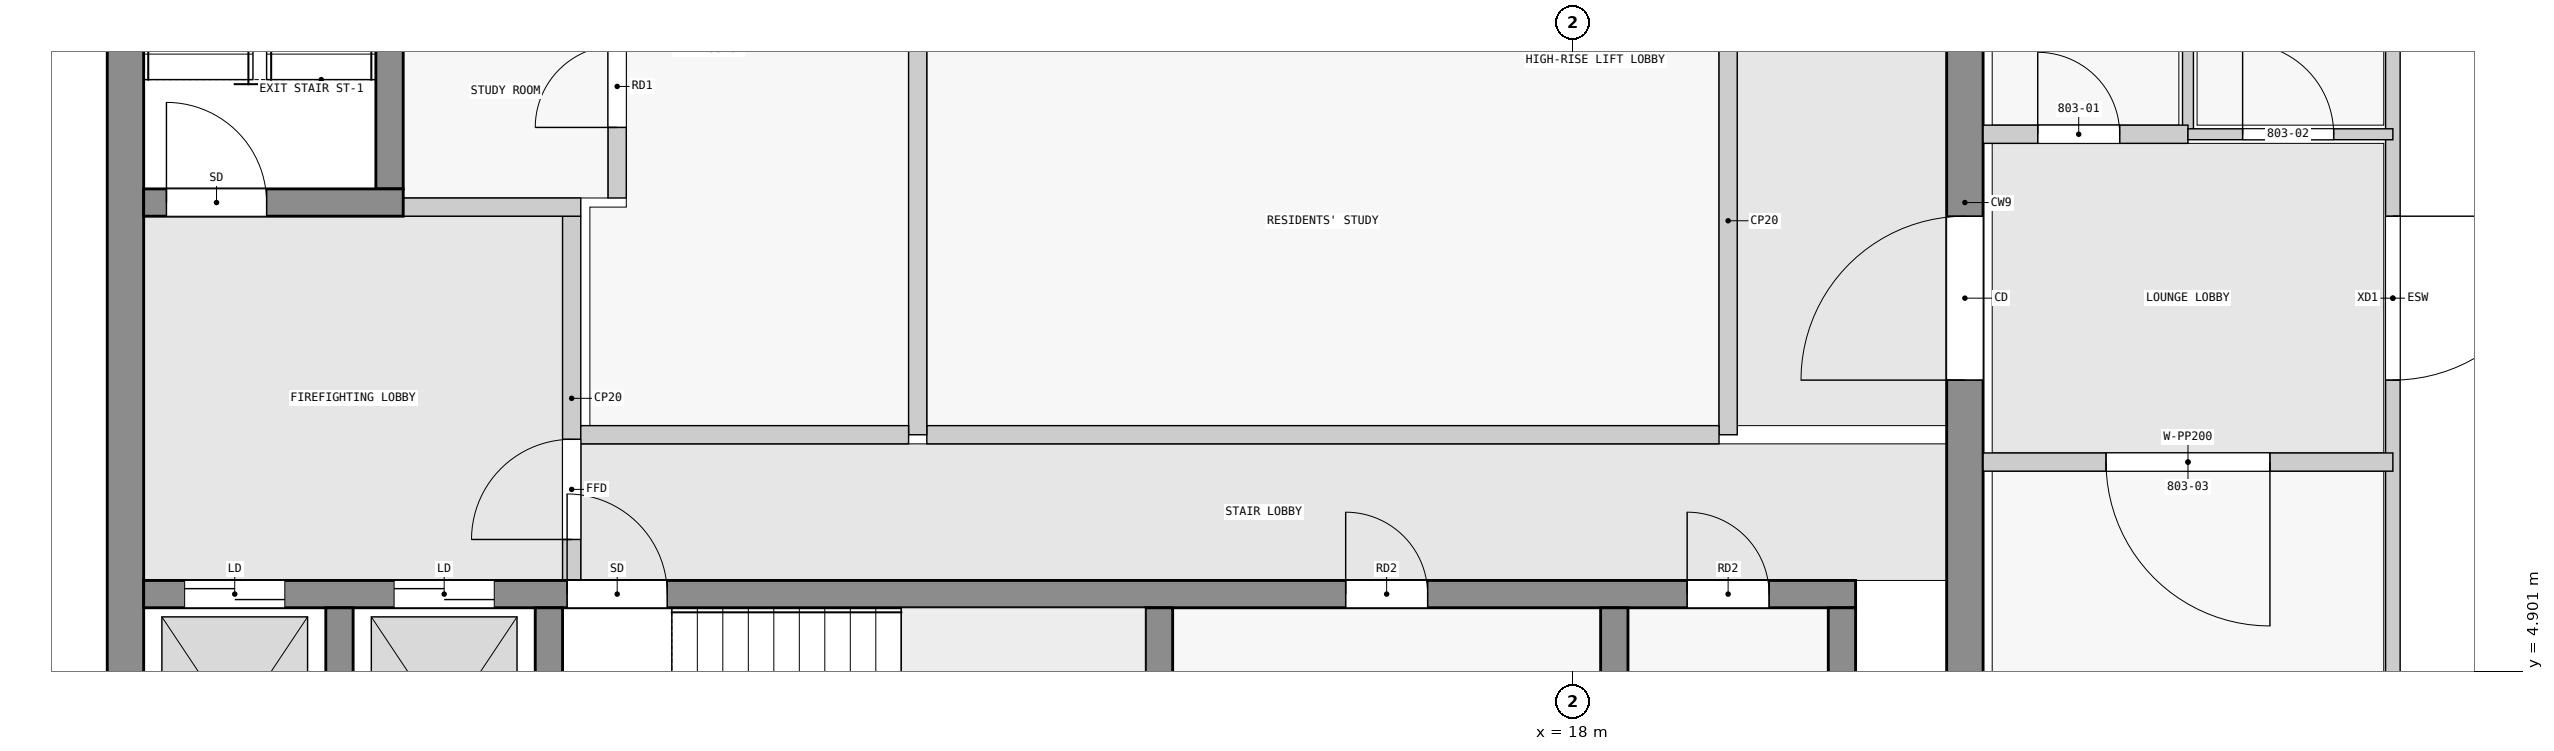
"""IFC4 building model, lengths in metres.
Left out: names, types, materials, properties, quantities, classifications, styles, units other than length and angle.
Written with IfcOpenShell. Run it as: python <this file> out.ifc"""

import sys

from ifc_helpers import new_model, si_unit, direction, frame, frame_2d, origin, place, context, subcontext, project, spatial, rectangle, extrude, element, fill, save


model = new_model("IFC4")
c1 = context("Model", 3, precision=1e-05, world=origin(), true_north=direction((0.0, 1.0)))
c2 = subcontext(c1, "Body", "Model", "MODEL_VIEW")
j1 = project(units=[si_unit("LENGTHUNIT", "METRE"), si_unit("PLANEANGLEUNIT", "RADIAN")], contexts=[c1])
p1 = place(None, origin())
s1 = spatial("IfcSite", under=j1, at=p1, CompositionType="ELEMENT")
p2 = place(p1, origin())
s2 = spatial("IfcBuilding", under=s1, at=p2, CompositionType="ELEMENT")
p3 = place(p2, frame((0.0, 0.0, 301.9)))
s3 = spatial("IfcBuildingStorey", under=s2, at=p3, CompositionType="ELEMENT", Elevation=301.9)
p4 = place(p3, frame((2.1, 2.5, 0.0), z_axis=(0.0, 0.0, 1.0), x_axis=(0.0, 1.0, 0.0)))
e1 = element("IfcWall", 1, at=p4, inside=s3, PredefinedType="SHEAR", context=c2, shape_type="SweptSolid", body=[
    extrude(rectangle(XDim=15.1, YDim=0.4, at=frame_2d((7.55, 0.0))), origin(), (0.0, 0.0, 1.0), 3.25),
])
p5 = place(p3, frame((22.3, 2.5, 0.0), z_axis=(0.0, 0.0, 1.0), x_axis=(0.0, 1.0, 0.0)))
e2 = element("IfcWall", 2, at=p5, inside=s3, PredefinedType="SHEAR", context=c2, shape_type="SweptSolid", body=[
    extrude(rectangle(XDim=15.1, YDim=0.4, at=frame_2d((7.55, 0.0))), origin(), (0.0, 0.0, 1.0), 3.25),
])
p6 = place(p5, frame((5.6, 0.0, 0.0)))
e3 = element("IfcOpeningElement", 3, at=p6, cuts=e2, PredefinedType="OPENING", context=c2, shape_type="SweptSolid", body=[
    extrude(rectangle(XDim=1.8, YDim=2.1, at=frame_2d((0.9, 1.05))), frame((0.0, 0.21, 0.0), z_axis=(0.0, -1.0, 0.0), x_axis=(1.0, 0.0, 0.0)), (0.0, 0.0, 1.0), 0.42),
])
for number, where, z_axis, x_axis in (
    (4, (4.45, 2.8, 0.0), (0.0, 0.0, 1.0), (0.0, 1.0, 0.0)),
    (5, (6.75, 2.8, 0.0), (0.0, 0.0, 1.0), (0.0, 1.0, 0.0)),
    (6, (13.45, 2.8, 0.0), (0.0, 0.0, 1.0), (0.0, 1.0, 0.0)),
    (7, (18.45, 2.8, 0.0), (0.0, 0.0, 1.0), (0.0, 1.0, 0.0)),
    (8, (20.95, 2.8, 0.0), (0.0, 0.0, 1.0), (0.0, 1.0, 0.0)),
):
    element("IfcWall", number, at=place(p3, frame(where, z_axis=z_axis, x_axis=x_axis)), inside=s3, PredefinedType="SHEAR", context=c2, shape_type="SweptSolid", body=[
        extrude(rectangle(XDim=2.8, YDim=0.3, at=frame_2d((1.4, 0.0))), origin(), (0.0, 0.0, 1.0), 3.25),
    ])
p7 = place(p3, frame((2.3, 5.75, 0.0), z_axis=(0.0, 0.0, 1.0), x_axis=(1.0, 0.0, 0.0)))
e9 = element("IfcWall", 9, at=p7, inside=s3, PredefinedType="SHEAR", context=c2, shape_type="SweptSolid", body=[
    extrude(rectangle(XDim=18.8, YDim=0.3, at=frame_2d((9.4, 0.0))), origin(), (0.0, 0.0, 1.0), 3.25),
])
p8 = place(p7, frame((4.65, 0.0, 0.0)))
e10 = element("IfcOpeningElement", 10, at=p8, cuts=e9, PredefinedType="OPENING", context=c2, shape_type="SweptSolid", body=[
    extrude(rectangle(XDim=1.1, YDim=2.1, at=frame_2d((0.55, 1.05))), frame((0.0, 0.16, 0.0), z_axis=(0.0, -1.0, 0.0), x_axis=(1.0, 0.0, 0.0)), (0.0, 0.0, 1.0), 0.32),
])
p9 = place(p7, frame((0.45, 0.0, 0.0)))
e11 = element("IfcOpeningElement", 11, at=p9, cuts=e9, PredefinedType="OPENING", context=c2, shape_type="SweptSolid", body=[
    extrude(rectangle(XDim=1.1, YDim=2.1, at=frame_2d((0.55, 1.05))), frame((0.0, 0.16, 0.0), z_axis=(0.0, -1.0, 0.0), x_axis=(1.0, 0.0, 0.0)), (0.0, 0.0, 1.0), 0.32),
])
p10 = place(p7, frame((2.75, 0.0, 0.0)))
e12 = element("IfcOpeningElement", 12, at=p10, cuts=e9, PredefinedType="OPENING", context=c2, shape_type="SweptSolid", body=[
    extrude(rectangle(XDim=1.1, YDim=2.1, at=frame_2d((0.55, 1.05))), frame((0.0, 0.16, 0.0), z_axis=(0.0, -1.0, 0.0), x_axis=(1.0, 0.0, 0.0)), (0.0, 0.0, 1.0), 0.32),
])
p11 = place(p7, frame((13.2, 0.0, 0.0)))
e13 = element("IfcOpeningElement", 13, at=p11, cuts=e9, PredefinedType="OPENING", context=c2, shape_type="SweptSolid", body=[
    extrude(rectangle(XDim=0.9, YDim=2.1, at=frame_2d((0.45, 1.05))), frame((0.0, 0.16, 0.0), z_axis=(0.0, -1.0, 0.0), x_axis=(1.0, 0.0, 0.0)), (0.0, 0.0, 1.0), 0.32),
])
p12 = place(p7, frame((16.95, 0.0, 0.0)))
e14 = element("IfcOpeningElement", 14, at=p12, cuts=e9, PredefinedType="OPENING", context=c2, shape_type="SweptSolid", body=[
    extrude(rectangle(XDim=0.9, YDim=2.1, at=frame_2d((0.45, 1.05))), frame((0.0, 0.16, 0.0), z_axis=(0.0, -1.0, 0.0), x_axis=(1.0, 0.0, 0.0)), (0.0, 0.0, 1.0), 0.32),
])
p13 = place(p3, frame((2.3, 10.05, 0.0), z_axis=(0.0, 0.0, 1.0), x_axis=(1.0, 0.0, 0.0)))
e15 = element("IfcWall", 15, at=p13, inside=s3, PredefinedType="SHEAR", context=c2, shape_type="SweptSolid", body=[
    extrude(rectangle(XDim=2.85, YDim=0.3, at=frame_2d((1.425, 0.0))), origin(), (0.0, 0.0, 1.0), 3.25),
])
p14 = place(p13, frame((0.25, 0.0, 0.0)))
e16 = element("IfcOpeningElement", 16, at=p14, cuts=e15, PredefinedType="OPENING", context=c2, shape_type="SweptSolid", body=[
    extrude(rectangle(XDim=1.1, YDim=2.1, at=frame_2d((0.55, 1.05))), frame((0.0, 0.16, 0.0), z_axis=(0.0, -1.0, 0.0), x_axis=(1.0, 0.0, 0.0)), (0.0, 0.0, 1.0), 0.32),
])
p15 = place(p3, frame((5.0, 10.2, 0.0), z_axis=(0.0, 0.0, 1.0), x_axis=(0.0, 1.0, 0.0)))
e17 = element("IfcWall", 17, at=p15, inside=s3, PredefinedType="SHEAR", context=c2, shape_type="SweptSolid", body=[
    extrude(rectangle(XDim=6.4, YDim=0.3, at=frame_2d((3.2, 0.0))), origin(), (0.0, 0.0, 1.0), 3.25),
])
p16 = place(p3, frame((27.0, 13.477, 0.0), z_axis=(0.0, 0.0, 1.0), x_axis=(0.0, -1.0, 0.0)))
e18 = element("IfcWall", 18, at=p16, inside=s3, PredefinedType="STANDARD", context=c2, shape_type="SweptSolid", body=[
    extrude(rectangle(XDim=8.954, YDim=0.16, at=frame_2d((4.477, 0.0))), origin(), (0.0, 0.0, 1.0), 3.25),
])
p17 = place(p16, frame((3.577, 0.0, 0.0)))
e19 = element("IfcOpeningElement", 19, at=p17, cuts=e18, PredefinedType="OPENING", context=c2, shape_type="SweptSolid", body=[
    extrude(rectangle(XDim=1.8, YDim=2.4, at=frame_2d((0.9, 1.2))), frame((0.0, 0.09, 0.0), z_axis=(0.0, -1.0, 0.0), x_axis=(1.0, 0.0, 0.0)), (0.0, 0.0, 1.0), 0.18),
])
p18 = place(p3, frame((7.0, 5.9, 0.0), z_axis=(0.0, 0.0, 1.0), x_axis=(0.0, 1.0, 0.0)))
e20 = element("IfcWall", 20, at=p18, inside=s3, PredefinedType="PARTITIONING", context=c2, shape_type="SweptSolid", body=[
    extrude(rectangle(XDim=4.0, YDim=0.2, at=frame_2d((2.0, 0.0))), origin(), (0.0, 0.0, 1.0), 3.25),
])
p19 = place(p18, frame((0.45, 0.0, 0.0)))
e21 = element("IfcOpeningElement", 21, at=p19, cuts=e20, PredefinedType="OPENING", context=c2, shape_type="SweptSolid", body=[
    extrude(rectangle(XDim=1.1, YDim=2.1, at=frame_2d((0.55, 1.05))), frame((0.0, 0.11, 0.0), z_axis=(0.0, -1.0, 0.0), x_axis=(1.0, 0.0, 0.0)), (0.0, 0.0, 1.0), 0.22),
])
p20 = place(p3, frame((5.15, 10.0, 0.0), z_axis=(0.0, 0.0, 1.0), x_axis=(1.0, 0.0, 0.0)))
e22 = element("IfcWall", 22, at=p20, inside=s3, PredefinedType="PARTITIONING", context=c2, shape_type="SweptSolid", body=[
    extrude(rectangle(XDim=1.95, YDim=0.2, at=frame_2d((0.975, 0.0))), origin(), (0.0, 0.0, 1.0), 3.25),
])
p21 = place(p3, frame((7.1, 7.5, 0.0), z_axis=(0.0, 0.0, 1.0), x_axis=(1.0, 0.0, 0.0)))
e23 = element("IfcWall", 23, at=p21, inside=s3, PredefinedType="PARTITIONING", context=c2, shape_type="SweptSolid", body=[
    extrude(rectangle(XDim=3.6, YDim=0.2, at=frame_2d((1.8, 0.0))), origin(), (0.0, 0.0, 1.0), 3.25),
])
p22 = place(p3, frame((10.8, 7.5, 0.0), z_axis=(0.0, 0.0, 1.0), x_axis=(0.0, 1.0, 0.0)))
e24 = element("IfcWall", 24, at=p22, inside=s3, PredefinedType="PARTITIONING", context=c2, shape_type="SweptSolid", body=[
    extrude(rectangle(XDim=4.7, YDim=0.2, at=frame_2d((2.35, 0.0))), origin(), (0.0, 0.0, 1.0), 3.25),
])
p23 = place(p3, frame((10.9, 7.5, 0.0), z_axis=(0.0, 0.0, 1.0), x_axis=(1.0, 0.0, 0.0)))
e25 = element("IfcWall", 25, at=p23, inside=s3, PredefinedType="PARTITIONING", context=c2, shape_type="SweptSolid", body=[
    extrude(rectangle(XDim=8.7, YDim=0.2, at=frame_2d((4.35, 0.0))), origin(), (0.0, 0.0, 1.0), 3.25),
])
p24 = place(p3, frame((19.7, 7.5, 0.0), z_axis=(0.0, 0.0, 1.0), x_axis=(0.0, 1.0, 0.0)))
e26 = element("IfcWall", 26, at=p24, inside=s3, PredefinedType="PARTITIONING", context=c2, shape_type="SweptSolid", body=[
    extrude(rectangle(XDim=4.7, YDim=0.2, at=frame_2d((2.35, 0.0))), origin(), (0.0, 0.0, 1.0), 3.25),
])
p25 = place(p3, frame((7.5, 10.1, 0.0), z_axis=(0.0, 0.0, 1.0), x_axis=(0.0, 1.0, 0.0)))
e27 = element("IfcWall", 27, at=p25, inside=s3, PredefinedType="PARTITIONING", context=c2, shape_type="SweptSolid", body=[
    extrude(rectangle(XDim=7.5, YDim=0.2, at=frame_2d((3.75, 0.0))), origin(), (0.0, 0.0, 1.0), 3.25),
])
p26 = place(p25, frame((0.775, 0.0, 0.0)))
e28 = element("IfcOpeningElement", 28, at=p26, cuts=e27, PredefinedType="OPENING", context=c2, shape_type="SweptSolid", body=[
    extrude(rectangle(XDim=0.9, YDim=2.1, at=frame_2d((0.45, 1.05))), frame((0.0, 0.11, 0.0), z_axis=(0.0, -1.0, 0.0), x_axis=(1.0, 0.0, 0.0)), (0.0, 0.0, 1.0), 0.22),
])
p27 = place(p25, frame((3.225, 0.0, 0.0)))
e29 = element("IfcOpeningElement", 29, at=p27, cuts=e27, PredefinedType="OPENING", context=c2, shape_type="SweptSolid", body=[
    extrude(rectangle(XDim=0.9, YDim=2.1, at=frame_2d((0.45, 1.05))), frame((0.0, 0.11, 0.0), z_axis=(0.0, -1.0, 0.0), x_axis=(1.0, 0.0, 0.0)), (0.0, 0.0, 1.0), 0.22),
])
p28 = place(p25, frame((5.25, 0.0, 0.0)))
e30 = element("IfcOpeningElement", 30, at=p28, cuts=e27, PredefinedType="OPENING", context=c2, shape_type="SweptSolid", body=[
    extrude(rectangle(XDim=0.9, YDim=2.1, at=frame_2d((0.45, 1.05))), frame((0.0, 0.11, 0.0), z_axis=(0.0, -1.0, 0.0), x_axis=(1.0, 0.0, 0.0)), (0.0, 0.0, 1.0), 0.22),
])
p29 = place(p3, frame((24.75, 16.232, 0.0), z_axis=(0.0, 0.0, 1.0), x_axis=(0.0, -1.0, 0.0)))
e31 = element("IfcWall", 31, at=p29, inside=s3, PredefinedType="PARTITIONING", context=c2, shape_type="SweptSolid", body=[
    extrude(rectangle(XDim=5.432, YDim=0.12, at=frame_2d((2.716, 0.0))), origin(), (0.0, 0.0, 1.0), 2.797),
])
p30 = place(p3, frame((27.0, 7.2, 0.0), z_axis=(0.0, 0.0, 1.0), x_axis=(-1.0, 0.0, 0.0)))
e32 = element("IfcWall", 32, at=p30, inside=s3, PredefinedType="PARTITIONING", context=c2, shape_type="SweptSolid", body=[
    extrude(rectangle(XDim=4.5, YDim=0.2, at=frame_2d((2.25, 0.0))), origin(), (0.0, 0.0, 1.0), 2.642),
])
p31 = place(p30, frame((1.35, 0.0, 0.0)))
e33 = element("IfcOpeningElement", 33, at=p31, cuts=e32, PredefinedType="OPENING", context=c2, shape_type="SweptSolid", body=[
    extrude(rectangle(XDim=1.8, YDim=2.1, at=frame_2d((0.9, 1.05))), frame((0.0, 0.11, 0.0), z_axis=(0.0, -1.0, 0.0), x_axis=(1.0, 0.0, 0.0)), (0.0, 0.0, 1.0), 0.22),
])
p32 = place(p3, frame((22.5, 10.8, 0.0), z_axis=(0.0, 0.0, 1.0), x_axis=(1.0, 0.0, 0.0)))
e34 = element("IfcWall", 34, at=p32, inside=s3, PredefinedType="PARTITIONING", context=c2, shape_type="SweptSolid", body=[
    extrude(rectangle(XDim=2.25, YDim=0.2, at=frame_2d((1.125, 0.0))), origin(), (0.0, 0.0, 1.0), 3.25),
])
p33 = place(p32, frame((0.6, 0.0, 0.0)))
e35 = element("IfcOpeningElement", 35, at=p33, cuts=e34, PredefinedType="OPENING", context=c2, shape_type="SweptSolid", body=[
    extrude(rectangle(XDim=0.9, YDim=2.1, at=frame_2d((0.45, 1.05))), frame((0.0, 0.11, 0.0), z_axis=(0.0, -1.0, 0.0), x_axis=(1.0, 0.0, 0.0)), (0.0, 0.0, 1.0), 0.22),
])
p34 = place(p3, frame((24.75, 10.8, 0.0), z_axis=(0.0, 0.0, 1.0), x_axis=(1.0, 0.0, 0.0)))
e36 = element("IfcWall", 36, at=p34, inside=s3, PredefinedType="PARTITIONING", context=c2, shape_type="SweptSolid", body=[
    extrude(rectangle(XDim=2.25, YDim=0.12, at=frame_2d((1.125, 0.0))), origin(), (0.0, 0.0, 1.0), 2.642),
])
p35 = place(p34, frame((0.6, 0.0, 0.0)))
e37 = element("IfcOpeningElement", 37, at=p35, cuts=e36, PredefinedType="OPENING", context=c2, shape_type="SweptSolid", body=[
    extrude(rectangle(XDim=1.0, YDim=2.1, at=frame_2d((0.5, 1.05))), frame((0.0, 0.07, 0.0), z_axis=(0.0, -1.0, 0.0), x_axis=(1.0, 0.0, 0.0)), (0.0, 0.0, 1.0), 0.14),
])
p36 = place(p17, origin())
e38 = element("IfcDoor", 38, at=p36, inside=s3, OperationType="SINGLE_SWING_LEFT", PredefinedType="DOOR", context=c2, shape_type="SweptSolid", body=[
    extrude(rectangle(XDim=1.8, YDim=2.4, at=frame_2d((0.9, 1.2))), frame((0.0, 0.025, 0.0), z_axis=(0.0, -1.0, 0.0), x_axis=(1.0, 0.0, 0.0)), (0.0, 0.0, 1.0), 0.05),
])
fill(e19, e38)
p37 = place(p19, origin())
e39 = element("IfcDoor", 39, at=p37, inside=s3, OperationType="SINGLE_SWING_LEFT", PredefinedType="DOOR", context=c2, shape_type="SweptSolid", body=[
    extrude(rectangle(XDim=1.1, YDim=2.1, at=frame_2d((0.55, 1.05))), frame((0.0, 0.025, 0.0), z_axis=(0.0, -1.0, 0.0), x_axis=(1.0, 0.0, 0.0)), (0.0, 0.0, 1.0), 0.05),
])
fill(e21, e39)
p38 = place(p14, origin())
e40 = element("IfcDoor", 40, at=p38, inside=s3, OperationType="SINGLE_SWING_RIGHT", PredefinedType="DOOR", context=c2, shape_type="SweptSolid", body=[
    extrude(rectangle(XDim=1.1, YDim=2.1, at=frame_2d((0.55, 1.05))), frame((0.0, 0.025, 0.0), z_axis=(0.0, -1.0, 0.0), x_axis=(1.0, 0.0, 0.0)), (0.0, 0.0, 1.0), 0.05),
])
fill(e16, e40)
p39 = place(p8, origin())
e41 = element("IfcDoor", 41, at=p39, inside=s3, OperationType="SINGLE_SWING_LEFT", PredefinedType="DOOR", context=c2, shape_type="SweptSolid", body=[
    extrude(rectangle(XDim=1.1, YDim=2.1, at=frame_2d((0.55, 1.05))), frame((0.0, 0.025, 0.0), z_axis=(0.0, -1.0, 0.0), x_axis=(1.0, 0.0, 0.0)), (0.0, 0.0, 1.0), 0.05),
])
fill(e10, e41)
p40 = place(p9, origin())
e42 = element("IfcDoor", 42, at=p40, inside=s3, OperationType="DOUBLE_DOOR_SLIDING", PredefinedType="DOOR", context=c2, shape_type="SweptSolid", body=[
    extrude(rectangle(XDim=1.1, YDim=2.1, at=frame_2d((0.55, 1.05))), frame((0.0, 0.025, 0.0), z_axis=(0.0, -1.0, 0.0), x_axis=(1.0, 0.0, 0.0)), (0.0, 0.0, 1.0), 0.05),
])
fill(e11, e42)
p41 = place(p10, origin())
e43 = element("IfcDoor", 43, at=p41, inside=s3, OperationType="DOUBLE_DOOR_SLIDING", PredefinedType="DOOR", context=c2, shape_type="SweptSolid", body=[
    extrude(rectangle(XDim=1.1, YDim=2.1, at=frame_2d((0.55, 1.05))), frame((0.0, 0.025, 0.0), z_axis=(0.0, -1.0, 0.0), x_axis=(1.0, 0.0, 0.0)), (0.0, 0.0, 1.0), 0.05),
])
fill(e12, e43)
p42 = place(p6, origin())
e44 = element("IfcDoor", 44, at=p42, inside=s3, OperationType="DOUBLE_DOOR_SINGLE_SWING", PredefinedType="DOOR", context=c2, shape_type="SweptSolid", body=[
    extrude(rectangle(XDim=1.8, YDim=2.1, at=frame_2d((0.9, 1.05))), frame((0.0, 0.025, 0.0), z_axis=(0.0, -1.0, 0.0), x_axis=(1.0, 0.0, 0.0)), (0.0, 0.0, 1.0), 0.05),
])
fill(e3, e44)
p43 = place(p26, origin())
e45 = element("IfcDoor", 45, at=p43, inside=s3, OperationType="SINGLE_SWING_RIGHT", PredefinedType="DOOR", context=c2, shape_type="SweptSolid", body=[
    extrude(rectangle(XDim=0.9, YDim=2.1, at=frame_2d((0.45, 1.05))), frame((0.0, 0.025, 0.0), z_axis=(0.0, -1.0, 0.0), x_axis=(1.0, 0.0, 0.0)), (0.0, 0.0, 1.0), 0.05),
])
fill(e28, e45)
p44 = place(p11, origin())
e46 = element("IfcDoor", 46, at=p44, inside=s3, OperationType="SINGLE_SWING_LEFT", PredefinedType="DOOR", context=c2, shape_type="SweptSolid", body=[
    extrude(rectangle(XDim=0.9, YDim=2.1, at=frame_2d((0.45, 1.05))), frame((0.0, 0.025, 0.0), z_axis=(0.0, -1.0, 0.0), x_axis=(1.0, 0.0, 0.0)), (0.0, 0.0, 1.0), 0.05),
])
fill(e13, e46)
p45 = place(p12, origin())
e47 = element("IfcDoor", 47, at=p45, inside=s3, OperationType="SINGLE_SWING_LEFT", PredefinedType="DOOR", context=c2, shape_type="SweptSolid", body=[
    extrude(rectangle(XDim=0.9, YDim=2.1, at=frame_2d((0.45, 1.05))), frame((0.0, 0.025, 0.0), z_axis=(0.0, -1.0, 0.0), x_axis=(1.0, 0.0, 0.0)), (0.0, 0.0, 1.0), 0.05),
])
fill(e14, e47)
p46 = place(p33, origin())
e48 = element("IfcDoor", 48, at=p46, inside=s3, OperationType="SINGLE_SWING_LEFT", PredefinedType="DOOR", context=c2, shape_type="SweptSolid", body=[
    extrude(rectangle(XDim=0.9, YDim=2.1, at=frame_2d((0.45, 1.05))), frame((0.0, 0.025, 0.0), z_axis=(0.0, -1.0, 0.0), x_axis=(1.0, 0.0, 0.0)), (0.0, 0.0, 1.0), 0.05),
])
fill(e35, e48)
p47 = place(p35, origin())
e49 = element("IfcDoor", 49, at=p47, inside=s3, OperationType="SINGLE_SWING_LEFT", PredefinedType="DOOR", context=c2, shape_type="SweptSolid", body=[
    extrude(rectangle(XDim=1.0, YDim=2.1, at=frame_2d((0.5, 1.05))), frame((0.0, 0.025, 0.0), z_axis=(0.0, -1.0, 0.0), x_axis=(1.0, 0.0, 0.0)), (0.0, 0.0, 1.0), 0.05),
])
fill(e37, e49)
p48 = place(p31, origin())
e50 = element("IfcDoor", 50, at=p48, inside=s3, OperationType="DOUBLE_DOOR_SINGLE_SWING", PredefinedType="DOOR", context=c2, shape_type="SweptSolid", body=[
    extrude(rectangle(XDim=1.8, YDim=2.1, at=frame_2d((0.9, 1.05))), frame((0.0, 0.025, 0.0), z_axis=(0.0, -1.0, 0.0), x_axis=(1.0, 0.0, 0.0)), (0.0, 0.0, 1.0), 0.05),
])
fill(e33, e50)
save(model, sys.argv[1])
